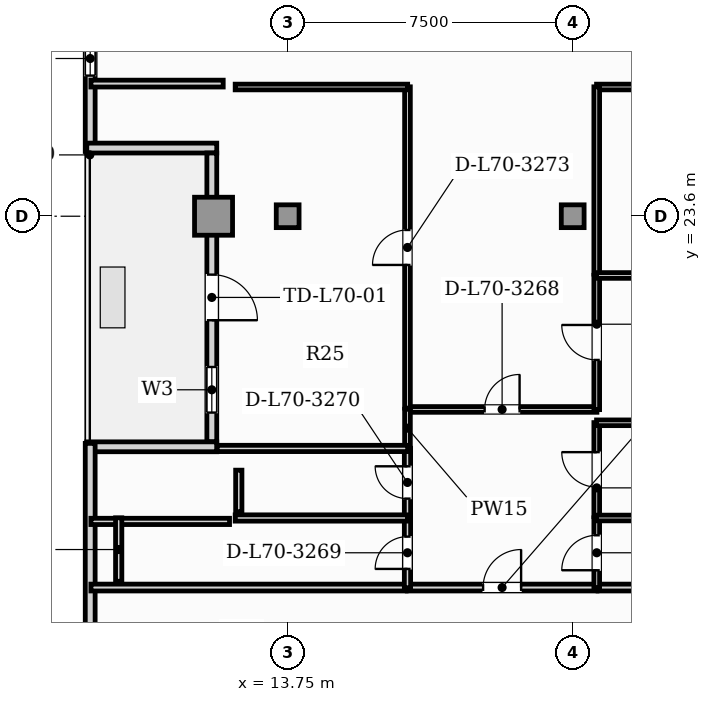
"""IFC4 building model, lengths in metres.
Left out: names, types, materials, properties, quantities, classifications, styles, units other than length and angle.
Written with IfcOpenShell. Run it as: python <this file> out.ifc"""

import sys

from ifc_helpers import new_model, si_unit, direction, frame, frame_2d, origin, origin_2d, place, context, subcontext, project, spatial, rectangle, hollow_rectangle, extrude, element, fill, save


model = new_model("IFC4")
c1 = context("Model", 3, precision=1e-05, world=origin(), true_north=direction((0.0, 1.0)))
c2 = subcontext(c1, "Body", "Model", "MODEL_VIEW")
j1 = project(units=[si_unit("LENGTHUNIT", "METRE"), si_unit("PLANEANGLEUNIT", "RADIAN")], contexts=[c1])
p1 = place(None, origin())
s1 = spatial("IfcSite", under=j1, at=p1, CompositionType="ELEMENT")
p2 = place(p1, origin())
s2 = spatial("IfcBuilding", under=s1, at=p2, CompositionType="ELEMENT")
p3 = place(p2, frame((0.0, 0.0, 284.9)))
s3 = spatial("IfcBuildingStorey", under=s2, at=p3, CompositionType="ELEMENT", Elevation=284.9)
p4 = place(p3, frame((11.8, 23.6, 0.0), z_axis=(0.0, 0.0, 1.0), x_axis=(1.0, 0.0, 0.0)))
e1 = element("IfcColumn", 1, at=p4, inside=s3, PredefinedType="USERDEFINED", context=c2, shape_type="SweptSolid", body=[
    extrude(hollow_rectangle(XDim=1.0, YDim=1.0, WallThickness=0.06, at=origin_2d()), origin(), (0.0, 0.0, 1.0), 3.85),
])
for number, where, z_axis, x_axis in (
    (2, (13.75, 23.6, 0.0), (0.0, 0.0, 1.0), (1.0, 0.0, 0.0)),
    (3, (21.25, 23.6, 0.0), (0.0, 0.0, 1.0), (1.0, 0.0, 0.0)),
):
    element("IfcColumn", number, at=place(p3, frame(where, z_axis=z_axis, x_axis=x_axis)), inside=s3, PredefinedType="COLUMN", context=c2, shape_type="SweptSolid", body=[
        extrude(rectangle(XDim=0.6, YDim=0.6, at=origin_2d()), origin(), (0.0, 0.0, 1.0), 3.85),
    ])
p5 = place(p3, frame((8.554, 31.287, 0.0), z_axis=(0.0, 0.0, 1.0), x_axis=(0.0, -1.0, 0.0)))
e4 = element("IfcWall", 4, at=p5, inside=s3, PredefinedType="SOLIDWALL", context=c2, shape_type="SweptSolid", body=[
    extrude(rectangle(XDim=5.983, YDim=0.26, at=frame_2d((2.992, 0.0))), origin(), (0.0, 0.0, 1.0), 3.65),
])
p6 = place(p5, frame((3.087, 0.0, 0.95)))
e5 = element("IfcOpeningElement", 5, at=p6, cuts=e4, PredefinedType="OPENING", context=c2, shape_type="SweptSolid", body=[
    extrude(rectangle(XDim=0.9, YDim=1.5, at=frame_2d((0.45, 0.75))), frame((0.0, 0.14, 0.0), z_axis=(0.0, -1.0, 0.0), x_axis=(1.0, 0.0, 0.0)), (0.0, 0.0, 1.0), 0.28),
])
p7 = place(p3, frame((8.464, 25.393, 0.0), z_axis=(0.0, 0.0, 1.0), x_axis=(1.0, 0.0, 0.0)))
e6 = element("IfcWall", 6, at=p7, inside=s3, PredefinedType="SOLIDWALL", context=c2, shape_type="SweptSolid", body=[
    extrude(rectangle(XDim=3.42, YDim=0.26, at=frame_2d((1.71, 0.0))), origin(), (0.0, 0.0, 1.0), 3.65),
])
p8 = place(p3, frame((11.754, 25.263, 0.0), z_axis=(0.0, 0.0, 1.0), x_axis=(0.0, -1.0, 0.0)))
e7 = element("IfcWall", 7, at=p8, inside=s3, PredefinedType="SOLIDWALL", context=c2, shape_type="SweptSolid", body=[
    extrude(rectangle(XDim=7.6, YDim=0.26, at=frame_2d((3.8, 0.0))), origin(), (0.0, 0.0, 1.0), 3.19),
])
p9 = place(p8, frame((3.2, 0.0, 0.0)))
e8 = element("IfcOpeningElement", 8, at=p9, cuts=e7, PredefinedType="OPENING", context=c2, shape_type="SweptSolid", body=[
    extrude(rectangle(XDim=1.2, YDim=2.2, at=frame_2d((0.6, 1.1))), frame((0.0, 0.14, 0.0), z_axis=(0.0, -1.0, 0.0), x_axis=(1.0, 0.0, 0.0)), (0.0, 0.0, 1.0), 0.28),
])
p10 = place(p8, frame((5.63, 0.0, 0.9)))
e9 = element("IfcOpeningElement", 9, at=p10, cuts=e7, PredefinedType="OPENING", context=c2, shape_type="SweptSolid", body=[
    extrude(rectangle(XDim=1.2, YDim=1.7, at=frame_2d((0.6, 0.85))), frame((0.0, 0.14, 0.0), z_axis=(0.0, -1.0, 0.0), x_axis=(1.0, 0.0, 0.0)), (0.0, 0.0, 1.0), 0.28),
])
p11 = place(p3, frame((11.884, 17.533, 0.0), z_axis=(0.0, 0.0, 1.0), x_axis=(-1.0, 0.0, 0.0)))
e10 = element("IfcWall", 10, at=p11, inside=s3, PredefinedType="SOLIDWALL", context=c2, shape_type="SweptSolid", body=[
    extrude(rectangle(XDim=3.42, YDim=0.26, at=frame_2d((1.71, 0.0))), origin(), (0.0, 0.0, 1.0), 3.65),
])
p12 = place(p3, frame((8.554, 17.623, 0.0), z_axis=(0.0, 0.0, 1.0), x_axis=(0.0, -1.0, 0.0)))
e11 = element("IfcWall", 11, at=p12, inside=s3, PredefinedType="SOLIDWALL", context=c2, shape_type="SweptSolid", body=[
    extrude(rectangle(XDim=14.383, YDim=0.26, at=frame_2d((7.192, 0.0))), origin(), (0.0, 0.0, 1.0), 3.65),
])
p13 = place(p12, frame((8.333, 0.0, 0.85)))
e12 = element("IfcOpeningElement", 12, at=p13, cuts=e11, PredefinedType="OPENING", context=c2, shape_type="SweptSolid", body=[
    extrude(rectangle(XDim=2.4, YDim=2.0, at=frame_2d((1.2, 1.0))), frame((0.0, 0.14, 0.0), z_axis=(0.0, -1.0, 0.0), x_axis=(1.0, 0.0, 0.0)), (0.0, 0.0, 1.0), 0.28),
])
p14 = place(p3, frame((16.898, 13.83, 0.0), z_axis=(0.0, 0.0, 1.0), x_axis=(1.0, 0.0, 0.0)))
e13 = element("IfcWall", 13, at=p14, inside=s3, PredefinedType="PARTITIONING", context=c2, shape_type="SweptSolid", body=[
    extrude(rectangle(XDim=4.99, YDim=0.18, at=frame_2d((2.495, 0.0))), origin(), (0.0, 0.0, 1.0), 3.65),
])
p15 = place(p14, frame((1.995, 0.0, 0.0)))
e14 = element("IfcOpeningElement", 14, at=p15, cuts=e13, PredefinedType="OPENING", context=c2, shape_type="SweptSolid", body=[
    extrude(rectangle(XDim=1.0, YDim=2.15, at=frame_2d((0.5, 1.075))), frame((0.0, 0.1, 0.0), z_axis=(0.0, -1.0, 0.0), x_axis=(1.0, 0.0, 0.0)), (0.0, 0.0, 1.0), 0.2),
])
p16 = place(p3, frame((8.574, 13.83, 0.0), z_axis=(0.0, 0.0, 1.0), x_axis=(1.0, 0.0, 0.0)))
e15 = element("IfcWall", 15, at=p16, inside=s3, PredefinedType="PARTITIONING", context=c2, shape_type="SweptSolid", body=[
    extrude(rectangle(XDim=8.294, YDim=0.18, at=frame_2d((4.147, 0.0))), origin(), (0.0, 0.0, 1.0), 3.65),
])
p17 = place(p3, frame((21.917, 13.83, 0.0), z_axis=(0.0, 0.0, 1.0), x_axis=(1.0, 0.0, 0.0)))
e16 = element("IfcWall", 16, at=p17, inside=s3, PredefinedType="PARTITIONING", context=c2, shape_type="SweptSolid", body=[
    extrude(rectangle(XDim=7.492, YDim=0.18, at=frame_2d((3.746, 0.0))), origin(), (0.0, 0.0, 1.0), 3.65),
])
p18 = place(p3, frame((16.898, 18.516, 0.0), z_axis=(0.0, 0.0, 1.0), x_axis=(1.0, 0.0, 0.0)))
e17 = element("IfcWall", 17, at=p18, inside=s3, PredefinedType="PARTITIONING", context=c2, shape_type="SweptSolid", body=[
    extrude(rectangle(XDim=4.99, YDim=0.15, at=frame_2d((2.495, 0.0))), origin(), (0.0, 0.0, 1.0), 3.65),
])
p19 = place(p18, frame((2.035, 0.0, 0.0)))
e18 = element("IfcOpeningElement", 18, at=p19, cuts=e17, PredefinedType="OPENING", context=c2, shape_type="SweptSolid", body=[
    extrude(rectangle(XDim=0.92, YDim=2.1, at=frame_2d((0.46, 1.05))), frame((0.0, 0.085, 0.0), z_axis=(0.0, -1.0, 0.0), x_axis=(1.0, 0.0, 0.0)), (0.0, 0.0, 1.0), 0.17),
])
p20 = place(p3, frame((16.903, 13.825, 0.0), z_axis=(0.0, 0.0, 1.0), x_axis=(0.0, 1.0, 0.0)))
e19 = element("IfcWall", 19, at=p20, inside=s3, PredefinedType="PLUMBINGWALL", context=c2, shape_type="SweptSolid", body=[
    extrude(rectangle(XDim=1.84, YDim=0.165, at=frame_2d((0.92, 0.0))), origin(), (0.0, 0.0, 1.0), 3.65),
])
p21 = place(p20, frame((0.495, 0.0, 0.0)))
e20 = element("IfcOpeningElement", 20, at=p21, cuts=e19, PredefinedType="OPENING", context=c2, shape_type="SweptSolid", body=[
    extrude(rectangle(XDim=0.85, YDim=2.1, at=frame_2d((0.425, 1.05))), frame((0.0, 0.093, 0.0), z_axis=(0.0, -1.0, 0.0), x_axis=(1.0, 0.0, 0.0)), (0.0, 0.0, 1.0), 0.185),
])
p22 = place(p3, frame((16.903, 15.695, 0.0), z_axis=(0.0, 0.0, 1.0), x_axis=(0.0, 1.0, 0.0)))
e21 = element("IfcWall", 21, at=p22, inside=s3, PredefinedType="PLUMBINGWALL", context=c2, shape_type="SweptSolid", body=[
    extrude(rectangle(XDim=1.8, YDim=0.165, at=frame_2d((0.9, 0.0))), origin(), (0.0, 0.0, 1.0), 3.65),
])
p23 = place(p22, frame((0.475, 0.0, 0.0)))
e22 = element("IfcOpeningElement", 22, at=p23, cuts=e21, PredefinedType="OPENING", context=c2, shape_type="SweptSolid", body=[
    extrude(rectangle(XDim=0.85, YDim=2.1, at=frame_2d((0.425, 1.05))), frame((0.0, 0.093, 0.0), z_axis=(0.0, -1.0, 0.0), x_axis=(1.0, 0.0, 0.0)), (0.0, 0.0, 1.0), 0.185),
])
p24 = place(p3, frame((16.903, 17.525, 0.0), z_axis=(0.0, 0.0, 1.0), x_axis=(0.0, 1.0, 0.0)))
e23 = element("IfcWall", 23, at=p24, inside=s3, PredefinedType="PARTITIONING", context=c2, shape_type="SweptSolid", body=[
    extrude(rectangle(XDim=0.996, YDim=0.15, at=frame_2d((0.498, 0.0))), origin(), (0.0, 0.0, 1.0), 3.65),
])
p25 = place(p3, frame((21.883, 13.825, 0.0), z_axis=(0.0, 0.0, 1.0), x_axis=(0.0, 1.0, 0.0)))
e24 = element("IfcWall", 24, at=p25, inside=s3, PredefinedType="PARTITIONING", context=c2, shape_type="SweptSolid", body=[
    extrude(rectangle(XDim=1.84, YDim=0.15, at=frame_2d((0.92, 0.0))), origin(), (0.0, 0.0, 1.0), 3.65),
])
p26 = place(p25, frame((0.46, 0.0, 0.0)))
e25 = element("IfcOpeningElement", 25, at=p26, cuts=e24, PredefinedType="OPENING", context=c2, shape_type="SweptSolid", body=[
    extrude(rectangle(XDim=0.92, YDim=2.1, at=frame_2d((0.46, 1.05))), frame((0.0, 0.085, 0.0), z_axis=(0.0, -1.0, 0.0), x_axis=(1.0, 0.0, 0.0)), (0.0, 0.0, 1.0), 0.17),
])
p27 = place(p3, frame((21.883, 15.695, 0.0), z_axis=(0.0, 0.0, 1.0), x_axis=(0.0, 1.0, 0.0)))
e26 = element("IfcWall", 26, at=p27, inside=s3, PredefinedType="PARTITIONING", context=c2, shape_type="SweptSolid", body=[
    extrude(rectangle(XDim=2.475, YDim=0.15, at=frame_2d((1.237, 0.0))), origin(), (0.0, 0.0, 1.0), 3.65),
])
p28 = place(p27, frame((0.778, 0.0, 0.0)))
e27 = element("IfcOpeningElement", 27, at=p28, cuts=e26, PredefinedType="OPENING", context=c2, shape_type="SweptSolid", body=[
    extrude(rectangle(XDim=0.92, YDim=2.1, at=frame_2d((0.46, 1.05))), frame((0.0, 0.085, 0.0), z_axis=(0.0, -1.0, 0.0), x_axis=(1.0, 0.0, 0.0)), (0.0, 0.0, 1.0), 0.17),
])
p29 = place(p3, frame((16.903, 18.551, 0.0), z_axis=(0.0, 0.0, 1.0), x_axis=(0.0, 1.0, 0.0)))
e28 = element("IfcWall", 28, at=p29, inside=s3, PredefinedType="PARTITIONING", context=c2, shape_type="SweptSolid", body=[
    extrude(rectangle(XDim=8.454, YDim=0.15, at=frame_2d((4.227, 0.0))), origin(), (0.0, 0.0, 1.0), 3.65),
])
p30 = place(p29, frame((3.767, 0.0, 0.0)))
e29 = element("IfcOpeningElement", 29, at=p30, cuts=e28, PredefinedType="OPENING", context=c2, shape_type="SweptSolid", body=[
    extrude(rectangle(XDim=0.92, YDim=2.1, at=frame_2d((0.46, 1.05))), frame((0.0, 0.085, 0.0), z_axis=(0.0, -1.0, 0.0), x_axis=(1.0, 0.0, 0.0)), (0.0, 0.0, 1.0), 0.17),
])
p31 = place(p3, frame((12.369, 27.0, 0.0), z_axis=(0.0, 0.0, 1.0), x_axis=(1.0, 0.0, 0.0)))
e30 = element("IfcWall", 30, at=p31, inside=s3, PredefinedType="PARTITIONING", context=c2, shape_type="SweptSolid", body=[
    extrude(rectangle(XDim=4.539, YDim=0.15, at=frame_2d((2.269, 0.0))), origin(), (0.0, 0.0, 1.0), 3.65),
])
p32 = place(p3, frame((21.883, 18.511, 0.0), z_axis=(0.0, 0.0, 1.0), x_axis=(0.0, 1.0, 0.0)))
e31 = element("IfcWall", 31, at=p32, inside=s3, PredefinedType="PARTITIONING", context=c2, shape_type="SweptSolid", body=[
    extrude(rectangle(XDim=3.535, YDim=0.15, at=frame_2d((1.768, 0.0))), origin(), (0.0, 0.0, 1.0), 3.65),
])
p33 = place(p32, frame((1.308, 0.0, 0.0)))
e32 = element("IfcOpeningElement", 32, at=p33, cuts=e31, PredefinedType="OPENING", context=c2, shape_type="SweptSolid", body=[
    extrude(rectangle(XDim=0.92, YDim=2.1, at=frame_2d((0.46, 1.05))), frame((0.0, 0.085, 0.0), z_axis=(0.0, -1.0, 0.0), x_axis=(1.0, 0.0, 0.0)), (0.0, 0.0, 1.0), 0.17),
])
p34 = place(p3, frame((21.878, 27.0, 0.0), z_axis=(0.0, 0.0, 1.0), x_axis=(1.0, 0.0, 0.0)))
e33 = element("IfcWall", 33, at=p34, inside=s3, PredefinedType="PARTITIONING", context=c2, shape_type="SweptSolid", body=[
    extrude(rectangle(XDim=7.532, YDim=0.15, at=frame_2d((3.766, 0.0))), origin(), (0.0, 0.0, 1.0), 3.65),
])
p35 = place(p34, frame((3.306, 0.0, 0.0)))
e34 = element("IfcOpeningElement", 34, at=p35, cuts=e33, PredefinedType="OPENING", context=c2, shape_type="SweptSolid", body=[
    extrude(rectangle(XDim=0.92, YDim=2.1, at=frame_2d((0.46, 1.05))), frame((0.0, 0.085, 0.0), z_axis=(0.0, -1.0, 0.0), x_axis=(1.0, 0.0, 0.0)), (0.0, 0.0, 1.0), 0.17),
])
p36 = place(p3, frame((21.883, 22.076, 0.0), z_axis=(0.0, 0.0, 1.0), x_axis=(0.0, 1.0, 0.0)))
e35 = element("IfcWall", 35, at=p36, inside=s3, PredefinedType="PARTITIONING", context=c2, shape_type="SweptSolid", body=[
    extrude(rectangle(XDim=4.929, YDim=0.15, at=frame_2d((2.464, 0.0))), origin(), (0.0, 0.0, 1.0), 3.65),
])
p37 = place(p3, frame((12.369, 15.66, 0.0), z_axis=(0.0, 0.0, 1.0), x_axis=(1.0, 0.0, 0.0)))
e36 = element("IfcWall", 36, at=p37, inside=s3, PredefinedType="PLUMBINGWALL", context=c2, shape_type="SweptSolid", body=[
    extrude(rectangle(XDim=4.539, YDim=0.165, at=frame_2d((2.269, 0.0))), origin(), (0.0, 0.0, 1.0), 3.65),
])
p38 = place(p3, frame((11.896, 17.49, 0.0), z_axis=(0.0, 0.0, 1.0), x_axis=(1.0, 0.0, 0.0)))
e37 = element("IfcWall", 37, at=p38, inside=s3, PredefinedType="PLUMBINGWALL", context=c2, shape_type="SweptSolid", body=[
    extrude(rectangle(XDim=5.012, YDim=0.165, at=frame_2d((2.506, 0.0))), origin(), (0.0, 0.0, 1.0), 3.65),
])
for number, where, z_axis, x_axis in (
    (38, (21.878, 15.66, 0.0), (0.0, 0.0, 1.0), (1.0, 0.0, 0.0)),
    (39, (21.878, 18.165, 0.0), (0.0, 0.0, 1.0), (1.0, 0.0, 0.0)),
    (40, (21.878, 22.041, 0.0), (0.0, 0.0, 1.0), (1.0, 0.0, 0.0)),
):
    element("IfcWall", number, at=place(p3, frame(where, z_axis=z_axis, x_axis=x_axis)), inside=s3, PredefinedType="PARTITIONING", context=c2, shape_type="SweptSolid", body=[
        extrude(rectangle(XDim=7.532, YDim=0.15, at=frame_2d((3.766, 0.0))), origin(), (0.0, 0.0, 1.0), 3.65),
    ])
p39 = place(p3, frame((12.054, 27.09, 0.0), z_axis=(0.0, 0.0, 1.0), x_axis=(-1.0, 0.0, 0.0)))
e41 = element("IfcWall", 41, at=p39, inside=s3, PredefinedType="PARTITIONING", context=c2, shape_type="SweptSolid", body=[
    extrude(rectangle(XDim=3.48, YDim=0.18, at=frame_2d((1.74, 0.0))), origin(), (0.0, 0.0, 1.0), 3.65),
])
p40 = place(p3, frame((8.574, 15.57, 0.0), z_axis=(0.0, 0.0, 1.0), x_axis=(1.0, 0.0, 0.0)))
e42 = element("IfcWall", 42, at=p40, inside=s3, PredefinedType="PLUMBINGWALL", context=c2, shape_type="SweptSolid", body=[
    extrude(rectangle(XDim=3.647, YDim=0.165, at=frame_2d((1.823, 0.0))), origin(), (0.0, 0.0, 1.0), 3.65),
])
p41 = place(p3, frame((9.304, 13.995, 0.0), z_axis=(0.0, 0.0, 1.0), x_axis=(0.0, 1.0, 0.0)))
e43 = element("IfcWall", 43, at=p41, inside=s3, PredefinedType="PLUMBINGWALL", context=c2, shape_type="SweptSolid", body=[
    extrude(rectangle(XDim=1.67, YDim=0.165, at=frame_2d((0.835, 0.0))), origin(), (0.0, 0.0, 1.0), 3.65),
])
p42 = place(p3, frame((12.464, 15.825, 0.0), z_axis=(0.0, 0.0, 1.0), x_axis=(0.0, 1.0, 0.0)))
e44 = element("IfcWall", 44, at=p42, inside=s3, PredefinedType="PLUMBINGWALL", context=c2, shape_type="SweptSolid", body=[
    extrude(rectangle(XDim=1.094, YDim=0.165, at=frame_2d((0.547, 0.0))), origin(), (0.0, 0.0, 1.0), 3.65),
])
p43 = place(p9, frame((1.2, 0.0, 0.0), z_axis=(0.0, 0.0, 1.0), x_axis=(-1.0, 0.0, 0.0)))
e45 = element("IfcDoor", 45, at=p43, inside=s3, OperationType="SINGLE_SWING_LEFT", PredefinedType="DOOR", context=c2, shape_type="SweptSolid", body=[
    extrude(rectangle(XDim=1.2, YDim=2.2, at=frame_2d((0.6, 1.1))), frame((0.0, 0.025, 0.0), z_axis=(0.0, -1.0, 0.0), x_axis=(1.0, 0.0, 0.0)), (0.0, 0.0, 1.0), 0.05),
])
fill(e8, e45)
p44 = place(p6, origin())
e46 = element("IfcWindow", 46, at=p44, inside=s3, PartitioningType="SINGLE_PANEL", PredefinedType="WINDOW", context=c2, shape_type="SweptSolid", body=[
    extrude(rectangle(XDim=0.9, YDim=1.5, at=frame_2d((0.45, 0.75))), frame((0.0, 0.03, 0.0), z_axis=(0.0, -1.0, 0.0), x_axis=(1.0, 0.0, 0.0)), (0.0, 0.0, 1.0), 0.06),
])
fill(e5, e46)
p45 = place(p10, origin())
e47 = element("IfcWindow", 47, at=p45, inside=s3, PartitioningType="SINGLE_PANEL", PredefinedType="WINDOW", context=c2, shape_type="SweptSolid", body=[
    extrude(rectangle(XDim=1.2, YDim=1.7, at=frame_2d((0.6, 0.85))), frame((0.0, 0.03, 0.0), z_axis=(0.0, -1.0, 0.0), x_axis=(1.0, 0.0, 0.0)), (0.0, 0.0, 1.0), 0.06),
])
fill(e9, e47)
p46 = place(p15, origin())
e48 = element("IfcDoor", 48, at=p46, inside=s3, OperationType="SINGLE_SWING_RIGHT", PredefinedType="DOOR", context=c2, shape_type="SweptSolid", body=[
    extrude(rectangle(XDim=1.0, YDim=2.15, at=frame_2d((0.5, 1.075))), frame((0.0, 0.025, 0.0), z_axis=(0.0, -1.0, 0.0), x_axis=(1.0, 0.0, 0.0)), (0.0, 0.0, 1.0), 0.05),
])
fill(e14, e48)
p47 = place(p19, origin())
e49 = element("IfcDoor", 49, at=p47, inside=s3, OperationType="SINGLE_SWING_RIGHT", PredefinedType="DOOR", context=c2, shape_type="SweptSolid", body=[
    extrude(rectangle(XDim=0.92, YDim=2.1, at=frame_2d((0.46, 1.05))), frame((0.0, 0.025, 0.0), z_axis=(0.0, -1.0, 0.0), x_axis=(1.0, 0.0, 0.0)), (0.0, 0.0, 1.0), 0.05),
])
fill(e18, e49)
p48 = place(p21, origin())
e50 = element("IfcDoor", 50, at=p48, inside=s3, OperationType="SINGLE_SWING_LEFT", PredefinedType="DOOR", context=c2, shape_type="SweptSolid", body=[
    extrude(rectangle(XDim=0.85, YDim=2.1, at=frame_2d((0.425, 1.05))), frame((0.0, 0.025, 0.0), z_axis=(0.0, -1.0, 0.0), x_axis=(1.0, 0.0, 0.0)), (0.0, 0.0, 1.0), 0.05),
])
fill(e20, e50)
p49 = place(p23, origin())
e51 = element("IfcDoor", 51, at=p49, inside=s3, OperationType="SINGLE_SWING_RIGHT", PredefinedType="DOOR", context=c2, shape_type="SweptSolid", body=[
    extrude(rectangle(XDim=0.85, YDim=2.1, at=frame_2d((0.425, 1.05))), frame((0.0, 0.025, 0.0), z_axis=(0.0, -1.0, 0.0), x_axis=(1.0, 0.0, 0.0)), (0.0, 0.0, 1.0), 0.05),
])
fill(e22, e51)
p50 = place(p26, origin())
e52 = element("IfcDoor", 52, at=p50, inside=s3, OperationType="SINGLE_SWING_LEFT", PredefinedType="DOOR", context=c2, shape_type="SweptSolid", body=[
    extrude(rectangle(XDim=0.92, YDim=2.1, at=frame_2d((0.46, 1.05))), frame((0.0, 0.025, 0.0), z_axis=(0.0, -1.0, 0.0), x_axis=(1.0, 0.0, 0.0)), (0.0, 0.0, 1.0), 0.05),
])
fill(e25, e52)
p51 = place(p28, origin())
e53 = element("IfcDoor", 53, at=p51, inside=s3, OperationType="SINGLE_SWING_RIGHT", PredefinedType="DOOR", context=c2, shape_type="SweptSolid", body=[
    extrude(rectangle(XDim=0.92, YDim=2.1, at=frame_2d((0.46, 1.05))), frame((0.0, 0.025, 0.0), z_axis=(0.0, -1.0, 0.0), x_axis=(1.0, 0.0, 0.0)), (0.0, 0.0, 1.0), 0.05),
])
fill(e27, e53)
p52 = place(p30, origin())
e54 = element("IfcDoor", 54, at=p52, inside=s3, OperationType="SINGLE_SWING_LEFT", PredefinedType="DOOR", context=c2, shape_type="SweptSolid", body=[
    extrude(rectangle(XDim=0.92, YDim=2.1, at=frame_2d((0.46, 1.05))), frame((0.0, 0.025, 0.0), z_axis=(0.0, -1.0, 0.0), x_axis=(1.0, 0.0, 0.0)), (0.0, 0.0, 1.0), 0.05),
])
fill(e29, e54)
p53 = place(p33, origin())
e55 = element("IfcDoor", 55, at=p53, inside=s3, OperationType="SINGLE_SWING_RIGHT", PredefinedType="DOOR", context=c2, shape_type="SweptSolid", body=[
    extrude(rectangle(XDim=0.92, YDim=2.1, at=frame_2d((0.46, 1.05))), frame((0.0, 0.025, 0.0), z_axis=(0.0, -1.0, 0.0), x_axis=(1.0, 0.0, 0.0)), (0.0, 0.0, 1.0), 0.05),
])
fill(e32, e55)
save(model, sys.argv[1])
